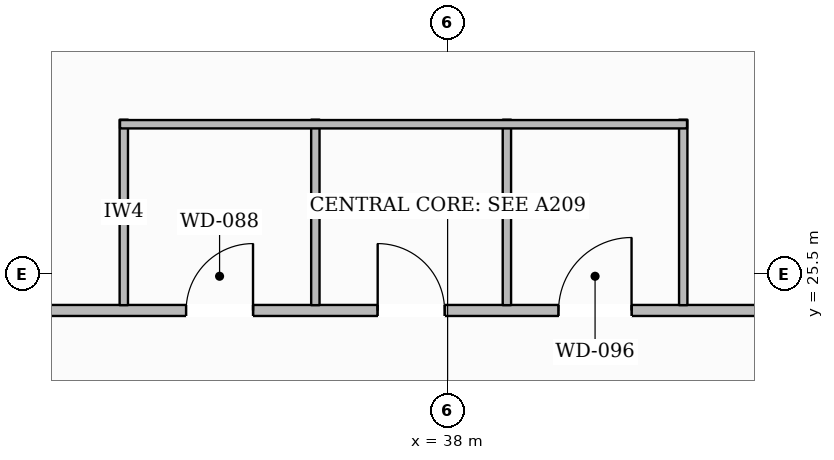
"""IFC4 building model, lengths in metres.
Left out: names, types, materials, properties, quantities, classifications, styles, units other than length and angle.
Written with IfcOpenShell. Run it as: python <this file> out.ifc"""

import sys

from ifc_helpers import new_model, si_unit, direction, frame, frame_2d, origin, place, context, subcontext, project, spatial, rectangle, extrude, element, fill, save


model = new_model("IFC4")
c1 = context("Model", 3, precision=1e-05, world=origin(), true_north=direction((0.0, 1.0)))
c2 = subcontext(c1, "Body", "Model", "MODEL_VIEW")
j1 = project(units=[si_unit("LENGTHUNIT", "METRE"), si_unit("PLANEANGLEUNIT", "RADIAN")], contexts=[c1])
p1 = place(None, origin())
s1 = spatial("IfcSite", under=j1, at=p1, CompositionType="ELEMENT")
p2 = place(p1, origin())
s2 = spatial("IfcBuilding", under=s1, at=p2, CompositionType="ELEMENT")
p3 = place(p2, frame((0.0, 0.0, 203.5)))
s3 = spatial("IfcBuildingStorey", under=s2, at=p3, CompositionType="ELEMENT", Elevation=203.5)
p4 = place(p3, frame((14.405, 11.157, 0.0), z_axis=(0.0, 0.0, 1.0), x_axis=(0.507147779291, 0.861859112593, 0.0)))
e1 = element("IfcWall", 1, at=p4, inside=s3, PredefinedType="STANDARD", context=c2, shape_type="SweptSolid", body=[
    extrude(rectangle(XDim=38.111, YDim=0.35, at=frame_2d((19.056, 0.0))), origin(), (0.0, 0.0, 1.0), 3.132),
])
p5 = place(p4, frame((33.816, 0.0, 0.65)))
e2 = element("IfcOpeningElement", 2, at=p5, cuts=e1, PredefinedType="OPENING", context=c2, shape_type="SweptSolid", body=[
    extrude(rectangle(XDim=1.45, YDim=1.75, at=frame_2d((0.725, 0.875))), frame((0.0, 0.185, 0.0), z_axis=(0.0, -1.0, 0.0), x_axis=(1.0, 0.0, 0.0)), (0.0, 0.0, 1.0), 0.37),
])
p6 = place(p4, frame((27.623, 0.0, 0.65)))
e3 = element("IfcOpeningElement", 3, at=p6, cuts=e1, PredefinedType="OPENING", context=c2, shape_type="SweptSolid", body=[
    extrude(rectangle(XDim=1.45, YDim=1.75, at=frame_2d((0.725, 0.875))), frame((0.0, 0.185, 0.0), z_axis=(0.0, -1.0, 0.0), x_axis=(1.0, 0.0, 0.0)), (0.0, 0.0, 1.0), 0.37),
])
p7 = place(p4, frame((15.239, 0.0, 0.65)))
e4 = element("IfcOpeningElement", 4, at=p7, cuts=e1, PredefinedType="OPENING", context=c2, shape_type="SweptSolid", body=[
    extrude(rectangle(XDim=1.45, YDim=1.75, at=frame_2d((0.725, 0.875))), frame((0.0, 0.185, 0.0), z_axis=(0.0, -1.0, 0.0), x_axis=(1.0, 0.0, 0.0)), (0.0, 0.0, 1.0), 0.37),
])
p8 = place(p4, frame((9.046, 0.0, 0.65)))
e5 = element("IfcOpeningElement", 5, at=p8, cuts=e1, PredefinedType="OPENING", context=c2, shape_type="SweptSolid", body=[
    extrude(rectangle(XDim=1.45, YDim=1.75, at=frame_2d((0.725, 0.875))), frame((0.0, 0.185, 0.0), z_axis=(0.0, -1.0, 0.0), x_axis=(1.0, 0.0, 0.0)), (0.0, 0.0, 1.0), 0.37),
])
p9 = place(p4, frame((2.854, 0.0, 0.65)))
e6 = element("IfcOpeningElement", 6, at=p9, cuts=e1, PredefinedType="OPENING", context=c2, shape_type="SweptSolid", body=[
    extrude(rectangle(XDim=1.45, YDim=1.75, at=frame_2d((0.725, 0.875))), frame((0.0, 0.185, 0.0), z_axis=(0.0, -1.0, 0.0), x_axis=(1.0, 0.0, 0.0)), (0.0, 0.0, 1.0), 0.37),
])
p10 = place(p3, frame((31.0, 25.02, 0.0), z_axis=(0.0, 0.0, 1.0), x_axis=(1.0, 0.0, 0.0)))
e7 = element("IfcWall", 7, at=p10, inside=s3, PredefinedType="PARTITIONING", context=c2, shape_type="SweptSolid", body=[
    extrude(rectangle(XDim=14.0, YDim=0.145, at=frame_2d((7.0, 0.0))), origin(), (0.0, 0.0, 1.0), 3.6),
])
p11 = place(p10, frame((3.56, 0.0, 0.0)))
e8 = element("IfcOpeningElement", 8, at=p11, cuts=e7, PredefinedType="OPENING", context=c2, shape_type="SweptSolid", body=[
    extrude(rectangle(XDim=0.88, YDim=2.1, at=frame_2d((0.44, 1.05))), frame((0.0, 0.083, 0.0), z_axis=(0.0, -1.0, 0.0), x_axis=(1.0, 0.0, 0.0)), (0.0, 0.0, 1.0), 0.165),
])
p12 = place(p10, frame((6.08, 0.0, 0.0)))
e9 = element("IfcOpeningElement", 9, at=p12, cuts=e7, PredefinedType="OPENING", context=c2, shape_type="SweptSolid", body=[
    extrude(rectangle(XDim=0.88, YDim=2.1, at=frame_2d((0.44, 1.05))), frame((0.0, 0.083, 0.0), z_axis=(0.0, -1.0, 0.0), x_axis=(1.0, 0.0, 0.0)), (0.0, 0.0, 1.0), 0.165),
])
p13 = place(p10, frame((8.46, 0.0, 0.0)))
e10 = element("IfcOpeningElement", 10, at=p13, cuts=e7, PredefinedType="OPENING", context=c2, shape_type="SweptSolid", body=[
    extrude(rectangle(XDim=0.96, YDim=2.1, at=frame_2d((0.48, 1.05))), frame((0.0, 0.083, 0.0), z_axis=(0.0, -1.0, 0.0), x_axis=(1.0, 0.0, 0.0)), (0.0, 0.0, 1.0), 0.165),
])
p14 = place(p3, frame((33.74, 25.09, 0.0), z_axis=(0.0, 0.0, 1.0), x_axis=(0.0, 1.0, 0.0)))
e11 = element("IfcWall", 11, at=p14, inside=s3, PredefinedType="PLUMBINGWALL", context=c2, shape_type="SweptSolid", body=[
    extrude(rectangle(XDim=2.44, YDim=0.11, at=frame_2d((1.22, 0.0))), origin(), (0.0, 0.0, 1.0), 3.141),
])
for number, where, z_axis, x_axis in (
    (12, (36.26, 25.09, 0.0), (0.0, 0.0, 1.0), (0.0, 1.0, 0.0)),
    (13, (38.78, 25.09, 0.0), (0.0, 0.0, 1.0), (0.0, 1.0, 0.0)),
    (14, (41.1, 25.09, 0.0), (0.0, 0.0, 1.0), (0.0, 1.0, 0.0)),
):
    element("IfcWall", number, at=place(p3, frame(where, z_axis=z_axis, x_axis=x_axis)), inside=s3, PredefinedType="PLUMBINGWALL", context=c2, shape_type="SweptSolid", body=[
        extrude(rectangle(XDim=2.44, YDim=0.11, at=frame_2d((1.22, 0.0))), origin(), (0.0, 0.0, 1.0), 3.6),
    ])
p15 = place(p3, frame((33.69, 27.47, 0.0), z_axis=(0.0, 0.0, 1.0), x_axis=(1.0, 0.0, 0.0)))
e15 = element("IfcWall", 15, at=p15, inside=s3, PredefinedType="PLUMBINGWALL", context=c2, shape_type="SweptSolid", body=[
    extrude(rectangle(XDim=7.46, YDim=0.11, at=frame_2d((3.73, 0.0))), origin(), (0.0, 0.0, 1.0), 3.6),
])
p16 = place(p11, origin())
e16 = element("IfcDoor", 16, at=p16, inside=s3, OperationType="SINGLE_SWING_RIGHT", PredefinedType="DOOR", context=c2, shape_type="SweptSolid", body=[
    extrude(rectangle(XDim=0.88, YDim=2.1, at=frame_2d((0.44, 1.05))), frame((0.0, 0.025, 0.0), z_axis=(0.0, -1.0, 0.0), x_axis=(1.0, 0.0, 0.0)), (0.0, 0.0, 1.0), 0.05),
])
fill(e8, e16)
p17 = place(p12, origin())
e17 = element("IfcDoor", 17, at=p17, inside=s3, OperationType="SINGLE_SWING_LEFT", PredefinedType="DOOR", context=c2, shape_type="SweptSolid", body=[
    extrude(rectangle(XDim=0.88, YDim=2.1, at=frame_2d((0.44, 1.05))), frame((0.0, 0.025, 0.0), z_axis=(0.0, -1.0, 0.0), x_axis=(1.0, 0.0, 0.0)), (0.0, 0.0, 1.0), 0.05),
])
fill(e9, e17)
p18 = place(p13, origin())
e18 = element("IfcDoor", 18, at=p18, inside=s3, OperationType="SINGLE_SWING_RIGHT", PredefinedType="DOOR", context=c2, shape_type="SweptSolid", body=[
    extrude(rectangle(XDim=0.96, YDim=2.1, at=frame_2d((0.48, 1.05))), frame((0.0, 0.025, 0.0), z_axis=(0.0, -1.0, 0.0), x_axis=(1.0, 0.0, 0.0)), (0.0, 0.0, 1.0), 0.05),
])
fill(e10, e18)
save(model, sys.argv[1])
